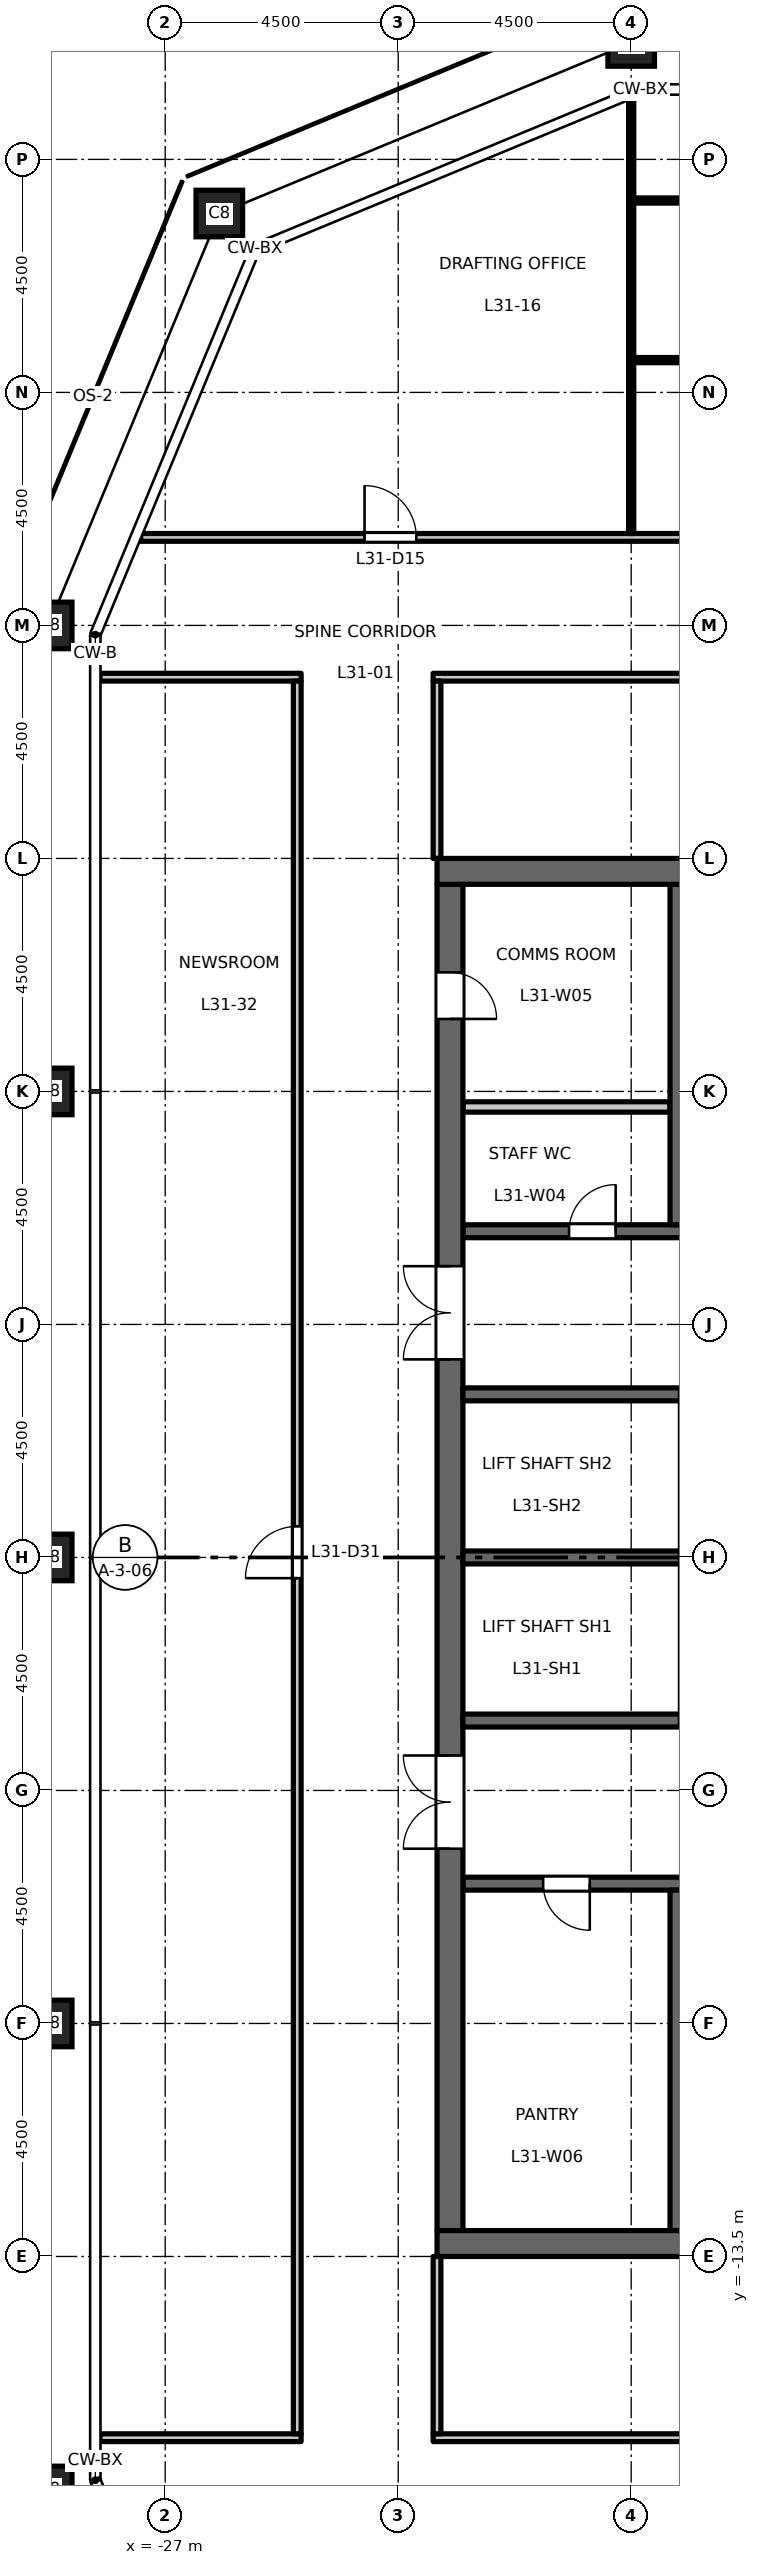
"""IFC4 building model, lengths in metres.
Left out: names, types, materials, properties, quantities, classifications, styles, units other than length and angle.
Written with IfcOpenShell. Run it as: python <this file> out.ifc"""

import sys

from ifc_helpers import new_model, si_unit, direction, frame, frame_2d, origin, origin_2d, place, context, subcontext, project, spatial, rectangle, hollow_rectangle, extrude, element, fill, save


model = new_model("IFC4")
c1 = context("Model", 3, precision=1e-05, world=origin(), true_north=direction((0.0, 1.0)))
c2 = subcontext(c1, "Body", "Model", "MODEL_VIEW")
j1 = project(units=[si_unit("LENGTHUNIT", "METRE"), si_unit("PLANEANGLEUNIT", "RADIAN")], contexts=[c1])
p1 = place(None, origin())
s1 = spatial("IfcSite", under=j1, at=p1, CompositionType="ELEMENT")
p2 = place(p1, origin())
s2 = spatial("IfcBuilding", under=s1, at=p2, CompositionType="ELEMENT")
p3 = place(p2, frame((0.0, 0.0, 145.2)))
s3 = spatial("IfcBuildingStorey", under=s2, at=p3, CompositionType="ELEMENT", Elevation=145.2)
for number, where, z_axis, x_axis in (
    (1, (-18.0, 29.25, 0.0), (0.0, 0.0, 1.0), (1.0, 0.0, 0.0)),
    (2, (-25.955, 25.955, 0.0), (0.0, 0.0, 1.0), (1.0, 0.0, 0.0)),
    (3, (-29.25, 18.0, 0.0), (0.0, 0.0, 1.0), (1.0, 0.0, 0.0)),
    (4, (-29.25, 9.0, 0.0), (0.0, 0.0, 1.0), (1.0, 0.0, 0.0)),
    (5, (-29.25, 0.0, 0.0), (0.0, 0.0, 1.0), (1.0, 0.0, 0.0)),
    (6, (-29.25, -9.0, 0.0), (0.0, 0.0, 1.0), (1.0, 0.0, 0.0)),
    (7, (-29.25, -18.0, 0.0), (0.0, 0.0, 1.0), (1.0, 0.0, 0.0)),
):
    element("IfcColumn", number, at=place(p3, frame(where, z_axis=z_axis, x_axis=x_axis)), inside=s3, PredefinedType="COLUMN", context=c2, shape_type="SweptSolid", body=[
        extrude(hollow_rectangle(XDim=0.9, YDim=0.9, WallThickness=0.05, at=origin_2d()), origin(), (0.0, 0.0, 1.0), 4.5),
    ])
p4 = place(p3, frame((-17.0, 6.3, 0.0), z_axis=(0.0, 0.0, 1.0), x_axis=(-1.0, 0.0, 0.0)))
e8 = element("IfcWall", 8, at=p4, inside=s3, PredefinedType="SHEAR", context=c2, shape_type="SweptSolid", body=[
    extrude(rectangle(XDim=4.25, YDim=0.25, at=frame_2d((2.125, 0.0))), origin(), (0.0, 0.0, 1.0), 4.35),
])
p5 = place(p4, frame((1.3, 0.0, 0.0)))
e9 = element("IfcOpeningElement", 9, at=p5, cuts=e8, PredefinedType="OPENING", context=c2, shape_type="SweptSolid", body=[
    extrude(rectangle(XDim=0.9, YDim=2.1, at=frame_2d((0.45, 1.05))), frame((0.0, 0.135, 0.0), z_axis=(0.0, -1.0, 0.0), x_axis=(1.0, 0.0, 0.0)), (0.0, 0.0, 1.0), 0.27),
])
p6 = place(p3, frame((-12.15, -6.3, 0.0), z_axis=(0.0, 0.0, 1.0), x_axis=(-1.0, 0.0, 0.0)))
e10 = element("IfcWall", 10, at=p6, inside=s3, PredefinedType="SHEAR", context=c2, shape_type="SweptSolid", body=[
    extrude(rectangle(XDim=9.1, YDim=0.25, at=frame_2d((4.55, 0.0))), origin(), (0.0, 0.0, 1.0), 4.35),
])
p7 = place(p6, frame((1.8, 0.0, 0.0)))
e11 = element("IfcOpeningElement", 11, at=p7, cuts=e10, PredefinedType="OPENING", context=c2, shape_type="SweptSolid", body=[
    extrude(rectangle(XDim=1.0, YDim=2.1, at=frame_2d((0.5, 1.05))), frame((0.0, 0.135, 0.0), z_axis=(0.0, -1.0, 0.0), x_axis=(1.0, 0.0, 0.0)), (0.0, 0.0, 1.0), 0.27),
])
p8 = place(p6, frame((6.65, 0.0, 0.0)))
e12 = element("IfcOpeningElement", 12, at=p8, cuts=e10, PredefinedType="OPENING", context=c2, shape_type="SweptSolid", body=[
    extrude(rectangle(XDim=0.9, YDim=2.1, at=frame_2d((0.45, 1.05))), frame((0.0, 0.135, 0.0), z_axis=(0.0, -1.0, 0.0), x_axis=(1.0, 0.0, 0.0)), (0.0, 0.0, 1.0), 0.27),
])
p9 = place(p3, frame((-21.5, -13.0, 0.0), z_axis=(0.0, 0.0, 1.0), x_axis=(0.0, 1.0, 0.0)))
e13 = element("IfcWall", 13, at=p9, inside=s3, PredefinedType="SHEAR", context=c2, shape_type="SweptSolid", body=[
    extrude(rectangle(XDim=26.0, YDim=0.5, at=frame_2d((13.0, 0.0))), origin(), (0.0, 0.0, 1.0), 4.35),
])
p10 = place(p9, frame((16.825, 0.0, 0.0)))
e14 = element("IfcOpeningElement", 14, at=p10, cuts=e13, PredefinedType="OPENING", context=c2, shape_type="SweptSolid", body=[
    extrude(rectangle(XDim=1.8, YDim=2.1, at=frame_2d((0.9, 1.05))), frame((0.0, 0.26, 0.0), z_axis=(0.0, -1.0, 0.0), x_axis=(1.0, 0.0, 0.0)), (0.0, 0.0, 1.0), 0.52),
])
p11 = place(p9, frame((7.375, 0.0, 0.0)))
e15 = element("IfcOpeningElement", 15, at=p11, cuts=e13, PredefinedType="OPENING", context=c2, shape_type="SweptSolid", body=[
    extrude(rectangle(XDim=1.8, YDim=2.1, at=frame_2d((0.9, 1.05))), frame((0.0, 0.26, 0.0), z_axis=(0.0, -1.0, 0.0), x_axis=(1.0, 0.0, 0.0)), (0.0, 0.0, 1.0), 0.52),
])
p12 = place(p9, frame((23.4, 0.0, 0.0)))
e16 = element("IfcOpeningElement", 16, at=p12, cuts=e13, PredefinedType="OPENING", context=c2, shape_type="SweptSolid", body=[
    extrude(rectangle(XDim=0.9, YDim=2.1, at=frame_2d((0.45, 1.05))), frame((0.0, 0.26, 0.0), z_axis=(0.0, -1.0, 0.0), x_axis=(1.0, 0.0, 0.0)), (0.0, 0.0, 1.0), 0.52),
])
p13 = place(p3, frame((-17.25, 8.7, 0.0), z_axis=(0.0, 0.0, 1.0), x_axis=(-1.0, 0.0, 0.0)))
e17 = element("IfcWall", 17, at=p13, inside=s3, PredefinedType="PARTITIONING", context=c2, shape_type="SweptSolid", body=[
    extrude(rectangle(XDim=4.0, YDim=0.2, at=frame_2d((2.0, 0.0))), origin(), (0.0, 0.0, 1.0), 4.35),
])
for number, where, z_axis, x_axis in (
    (18, (-17.05, 0.0, 0.0), (0.0, 0.0, 1.0), (-1.0, 0.0, 0.0)),
    (19, (-17.05, 3.15, 0.0), (0.0, 0.0, 1.0), (-1.0, 0.0, 0.0)),
    (20, (-17.05, -3.15, 0.0), (0.0, 0.0, 1.0), (-1.0, 0.0, 0.0)),
):
    element("IfcWall", number, at=place(p3, frame(where, z_axis=z_axis, x_axis=x_axis)), inside=s3, PredefinedType="SHEAR", context=c2, shape_type="SweptSolid", body=[
        extrude(rectangle(XDim=4.2, YDim=0.25, at=frame_2d((2.1, 0.0))), origin(), (0.0, 0.0, 1.0), 4.35),
    ])
for number, where, z_axis, x_axis in (
    (21, (-17.0, 6.425, 0.0), (0.0, 0.0, 1.0), (0.0, 1.0, 0.0)),
    (22, (-17.0, -13.0, 0.0), (0.0, 0.0, 1.0), (0.0, 1.0, 0.0)),
):
    element("IfcWall", number, at=place(p3, frame(where, z_axis=z_axis, x_axis=x_axis)), inside=s3, PredefinedType="SHEAR", context=c2, shape_type="SweptSolid", body=[
        extrude(rectangle(XDim=6.575, YDim=0.5, at=frame_2d((3.288, 0.0))), origin(), (0.0, 0.0, 1.0), 4.35),
    ])
for number, where, z_axis, x_axis in (
    (23, (-8.25, 13.25, 0.0), (0.0, 0.0, 1.0), (-1.0, 0.0, 0.0)),
    (24, (-8.25, -13.25, 0.0), (0.0, 0.0, 1.0), (-1.0, 0.0, 0.0)),
):
    element("IfcWall", number, at=place(p3, frame(where, z_axis=z_axis, x_axis=x_axis)), inside=s3, PredefinedType="SHEAR", context=c2, shape_type="SweptSolid", body=[
        extrude(rectangle(XDim=13.5, YDim=0.5, at=frame_2d((6.75, 0.0))), origin(), (0.0, 0.0, 1.0), 4.35),
    ])
p14 = place(p3, frame((-28.26, -17.0, 0.0), z_axis=(0.0, 0.0, 1.0), x_axis=(1.0, 0.0, 0.0)))
e25 = element("IfcWall", 25, at=p14, inside=s3, PredefinedType="PARTITIONING", context=c2, shape_type="SweptSolid", body=[
    extrude(rectangle(XDim=3.885, YDim=0.15, at=frame_2d((1.942, 0.0))), origin(), (0.0, 0.0, 1.0), 4.35),
])
p15 = place(p3, frame((-21.825, -17.0, 0.0), z_axis=(0.0, 0.0, 1.0), x_axis=(1.0, 0.0, 0.0)))
e26 = element("IfcWall", 26, at=p15, inside=s3, PredefinedType="PARTITIONING", context=c2, shape_type="SweptSolid", body=[
    extrude(rectangle(XDim=43.65, YDim=0.15, at=frame_2d((21.825, 0.0))), origin(), (0.0, 0.0, 1.0), 4.35),
])
p16 = place(p15, frame((17.175, 0.0, 0.0)))
e27 = element("IfcOpeningElement", 27, at=p16, cuts=e26, PredefinedType="OPENING", context=c2, shape_type="SweptSolid", body=[
    extrude(rectangle(XDim=1.0, YDim=2.1, at=frame_2d((0.5, 1.05))), frame((0.0, 0.085, 0.0), z_axis=(0.0, -1.0, 0.0), x_axis=(1.0, 0.0, 0.0)), (0.0, 0.0, 1.0), 0.17),
])
p17 = place(p15, frame((25.425, 0.0, 0.0)))
e28 = element("IfcOpeningElement", 28, at=p17, cuts=e26, PredefinedType="OPENING", context=c2, shape_type="SweptSolid", body=[
    extrude(rectangle(XDim=1.0, YDim=2.1, at=frame_2d((0.5, 1.05))), frame((0.0, 0.085, 0.0), z_axis=(0.0, -1.0, 0.0), x_axis=(1.0, 0.0, 0.0)), (0.0, 0.0, 1.0), 0.17),
])
p18 = place(p15, frame((6.425, 0.0, 0.0)))
e29 = element("IfcOpeningElement", 29, at=p18, cuts=e26, PredefinedType="OPENING", context=c2, shape_type="SweptSolid", body=[
    extrude(rectangle(XDim=1.0, YDim=2.1, at=frame_2d((0.5, 1.05))), frame((0.0, 0.085, 0.0), z_axis=(0.0, -1.0, 0.0), x_axis=(1.0, 0.0, 0.0)), (0.0, 0.0, 1.0), 0.17),
])
p19 = place(p15, frame((36.425, 0.0, 0.0)))
e30 = element("IfcOpeningElement", 30, at=p19, cuts=e26, PredefinedType="OPENING", context=c2, shape_type="SweptSolid", body=[
    extrude(rectangle(XDim=1.0, YDim=2.1, at=frame_2d((0.5, 1.05))), frame((0.0, 0.085, 0.0), z_axis=(0.0, -1.0, 0.0), x_axis=(1.0, 0.0, 0.0)), (0.0, 0.0, 1.0), 0.17),
])
p20 = place(p3, frame((-28.26, 17.0, 0.0), z_axis=(0.0, 0.0, 1.0), x_axis=(1.0, 0.0, 0.0)))
e31 = element("IfcWall", 31, at=p20, inside=s3, PredefinedType="PARTITIONING", context=c2, shape_type="SweptSolid", body=[
    extrude(rectangle(XDim=3.885, YDim=0.15, at=frame_2d((1.942, 0.0))), origin(), (0.0, 0.0, 1.0), 4.35),
])
p21 = place(p3, frame((-21.825, 17.0, 0.0), z_axis=(0.0, 0.0, 1.0), x_axis=(1.0, 0.0, 0.0)))
e32 = element("IfcWall", 32, at=p21, inside=s3, PredefinedType="PARTITIONING", context=c2, shape_type="SweptSolid", body=[
    extrude(rectangle(XDim=43.65, YDim=0.15, at=frame_2d((21.825, 0.0))), origin(), (0.0, 0.0, 1.0), 4.35),
])
p22 = place(p21, frame((21.225, 0.0, 0.0)))
e33 = element("IfcOpeningElement", 33, at=p22, cuts=e32, PredefinedType="OPENING", context=c2, shape_type="SweptSolid", body=[
    extrude(rectangle(XDim=1.0, YDim=2.1, at=frame_2d((0.5, 1.05))), frame((0.0, 0.085, 0.0), z_axis=(0.0, -1.0, 0.0), x_axis=(1.0, 0.0, 0.0)), (0.0, 0.0, 1.0), 0.17),
])
p23 = place(p21, frame((6.225, 0.0, 0.0)))
e34 = element("IfcOpeningElement", 34, at=p23, cuts=e32, PredefinedType="OPENING", context=c2, shape_type="SweptSolid", body=[
    extrude(rectangle(XDim=1.0, YDim=2.1, at=frame_2d((0.5, 1.05))), frame((0.0, 0.085, 0.0), z_axis=(0.0, -1.0, 0.0), x_axis=(1.0, 0.0, 0.0)), (0.0, 0.0, 1.0), 0.17),
])
p24 = place(p21, frame((36.225, 0.0, 0.0)))
e35 = element("IfcOpeningElement", 35, at=p24, cuts=e32, PredefinedType="OPENING", context=c2, shape_type="SweptSolid", body=[
    extrude(rectangle(XDim=1.0, YDim=2.1, at=frame_2d((0.5, 1.05))), frame((0.0, 0.085, 0.0), z_axis=(0.0, -1.0, 0.0), x_axis=(1.0, 0.0, 0.0)), (0.0, 0.0, 1.0), 0.17),
])
p25 = place(p3, frame((-27.474, 19.7, 0.0), z_axis=(0.0, 0.0, 1.0), x_axis=(1.0, 0.0, 0.0)))
e36 = element("IfcWall", 36, at=p25, inside=s3, PredefinedType="PARTITIONING", context=c2, shape_type="SweptSolid", body=[
    extrude(rectangle(XDim=54.948, YDim=0.15, at=frame_2d((27.474, 0.0))), origin(), (0.0, 0.0, 1.0), 4.35),
])
p26 = place(p25, frame((13.574, 0.0, 0.0)))
e37 = element("IfcOpeningElement", 37, at=p26, cuts=e36, PredefinedType="OPENING", context=c2, shape_type="SweptSolid", body=[
    extrude(rectangle(XDim=1.0, YDim=2.1, at=frame_2d((0.5, 1.05))), frame((0.0, 0.085, 0.0), z_axis=(0.0, -1.0, 0.0), x_axis=(1.0, 0.0, 0.0)), (0.0, 0.0, 1.0), 0.17),
])
p27 = place(p25, frame((22.574, 0.0, 0.0)))
e38 = element("IfcOpeningElement", 38, at=p27, cuts=e36, PredefinedType="OPENING", context=c2, shape_type="SweptSolid", body=[
    extrude(rectangle(XDim=1.0, YDim=2.1, at=frame_2d((0.5, 1.05))), frame((0.0, 0.085, 0.0), z_axis=(0.0, -1.0, 0.0), x_axis=(1.0, 0.0, 0.0)), (0.0, 0.0, 1.0), 0.17),
])
p28 = place(p25, frame((31.574, 0.0, 0.0)))
e39 = element("IfcOpeningElement", 39, at=p28, cuts=e36, PredefinedType="OPENING", context=c2, shape_type="SweptSolid", body=[
    extrude(rectangle(XDim=1.0, YDim=2.1, at=frame_2d((0.5, 1.05))), frame((0.0, 0.085, 0.0), z_axis=(0.0, -1.0, 0.0), x_axis=(1.0, 0.0, 0.0)), (0.0, 0.0, 1.0), 0.17),
])
p29 = place(p25, frame((40.574, 0.0, 0.0)))
e40 = element("IfcOpeningElement", 40, at=p29, cuts=e36, PredefinedType="OPENING", context=c2, shape_type="SweptSolid", body=[
    extrude(rectangle(XDim=1.0, YDim=2.1, at=frame_2d((0.5, 1.05))), frame((0.0, 0.085, 0.0), z_axis=(0.0, -1.0, 0.0), x_axis=(1.0, 0.0, 0.0)), (0.0, 0.0, 1.0), 0.17),
])
p30 = place(p25, frame((4.324, 0.0, 0.0)))
e41 = element("IfcOpeningElement", 41, at=p30, cuts=e36, PredefinedType="OPENING", context=c2, shape_type="SweptSolid", body=[
    extrude(rectangle(XDim=1.0, YDim=2.1, at=frame_2d((0.5, 1.05))), frame((0.0, 0.085, 0.0), z_axis=(0.0, -1.0, 0.0), x_axis=(1.0, 0.0, 0.0)), (0.0, 0.0, 1.0), 0.17),
])
p31 = place(p25, frame((49.798, 0.0, 0.0)))
e42 = element("IfcOpeningElement", 42, at=p31, cuts=e36, PredefinedType="OPENING", context=c2, shape_type="SweptSolid", body=[
    extrude(rectangle(XDim=1.0, YDim=2.1, at=frame_2d((0.5, 1.05))), frame((0.0, 0.085, 0.0), z_axis=(0.0, -1.0, 0.0), x_axis=(1.0, 0.0, 0.0)), (0.0, 0.0, 1.0), 0.17),
])
p32 = place(p3, frame((-17.95, 23.124, 0.0), z_axis=(0.0, 0.0, 1.0), x_axis=(1.0, 0.0, 0.0)))
e43 = element("IfcWall", 43, at=p32, inside=s3, PredefinedType="PARTITIONING", context=c2, shape_type="SweptSolid", body=[
    extrude(rectangle(XDim=8.9, YDim=0.1, at=frame_2d((4.45, 0.0))), origin(), (0.0, 0.0, 1.0), 4.35),
])
p33 = place(p32, frame((4.05, 0.0, 0.0)))
e44 = element("IfcOpeningElement", 44, at=p33, cuts=e43, PredefinedType="OPENING", context=c2, shape_type="SweptSolid", body=[
    extrude(rectangle(XDim=1.0, YDim=2.1, at=frame_2d((0.5, 1.05))), frame((0.0, 0.06, 0.0), z_axis=(0.0, -1.0, 0.0), x_axis=(1.0, 0.0, 0.0)), (0.0, 0.0, 1.0), 0.12),
])
p34 = place(p3, frame((-17.95, 26.206, 0.0), z_axis=(0.0, 0.0, 1.0), x_axis=(1.0, 0.0, 0.0)))
e45 = element("IfcWall", 45, at=p34, inside=s3, PredefinedType="PARTITIONING", context=c2, shape_type="SweptSolid", body=[
    extrude(rectangle(XDim=8.9, YDim=0.1, at=frame_2d((4.45, 0.0))), origin(), (0.0, 0.0, 1.0), 4.35),
])
p35 = place(p34, frame((4.05, 0.0, 0.0)))
e46 = element("IfcOpeningElement", 46, at=p35, cuts=e45, PredefinedType="OPENING", context=c2, shape_type="SweptSolid", body=[
    extrude(rectangle(XDim=1.0, YDim=2.1, at=frame_2d((0.5, 1.05))), frame((0.0, 0.06, 0.0), z_axis=(0.0, -1.0, 0.0), x_axis=(1.0, 0.0, 0.0)), (0.0, 0.0, 1.0), 0.12),
])
p36 = place(p3, frame((-24.45, -16.925, 0.0), z_axis=(0.0, 0.0, 1.0), x_axis=(0.0, 1.0, 0.0)))
e47 = element("IfcWall", 47, at=p36, inside=s3, PredefinedType="PARTITIONING", context=c2, shape_type="SweptSolid", body=[
    extrude(rectangle(XDim=33.85, YDim=0.15, at=frame_2d((16.925, 0.0))), origin(), (0.0, 0.0, 1.0), 4.35),
])
p37 = place(p36, frame((16.525, 0.0, 0.0)))
e48 = element("IfcOpeningElement", 48, at=p37, cuts=e47, PredefinedType="OPENING", context=c2, shape_type="SweptSolid", body=[
    extrude(rectangle(XDim=1.0, YDim=2.1, at=frame_2d((0.5, 1.05))), frame((0.0, 0.085, 0.0), z_axis=(0.0, -1.0, 0.0), x_axis=(1.0, 0.0, 0.0)), (0.0, 0.0, 1.0), 0.17),
])
for number, where, z_axis, x_axis in (
    (49, (-21.75, -16.925, 0.0), (0.0, 0.0, 1.0), (0.0, 1.0, 0.0)),
    (50, (-21.75, 13.5, 0.0), (0.0, 0.0, 1.0), (0.0, 1.0, 0.0)),
):
    element("IfcWall", number, at=place(p3, frame(where, z_axis=z_axis, x_axis=x_axis)), inside=s3, PredefinedType="PARTITIONING", context=c2, shape_type="SweptSolid", body=[
        extrude(rectangle(XDim=3.425, YDim=0.15, at=frame_2d((1.712, 0.0))), origin(), (0.0, 0.0, 1.0), 4.35),
    ])
p38 = place(p3, frame((-18.0, 19.775, 0.0), z_axis=(0.0, 0.0, 1.0), x_axis=(0.0, 1.0, 0.0)))
e51 = element("IfcWall", 51, at=p38, inside=s3, PredefinedType="PARTITIONING", context=c2, shape_type="SweptSolid", body=[
    extrude(rectangle(XDim=8.403, YDim=0.1, at=frame_2d((4.202, 0.0))), origin(), (0.0, 0.0, 1.0), 3.45),
])
p39 = place(p10, origin())
e52 = element("IfcDoor", 52, at=p39, inside=s3, OperationType="DOUBLE_DOOR_DOUBLE_SWING", PredefinedType="DOOR", context=c2, shape_type="SweptSolid", body=[
    extrude(rectangle(XDim=1.8, YDim=2.1, at=frame_2d((0.9, 1.05))), frame((0.0, 0.025, 0.0), z_axis=(0.0, -1.0, 0.0), x_axis=(1.0, 0.0, 0.0)), (0.0, 0.0, 1.0), 0.05),
])
fill(e14, e52)
p40 = place(p11, origin())
e53 = element("IfcDoor", 53, at=p40, inside=s3, OperationType="DOUBLE_DOOR_DOUBLE_SWING", PredefinedType="DOOR", context=c2, shape_type="SweptSolid", body=[
    extrude(rectangle(XDim=1.8, YDim=2.1, at=frame_2d((0.9, 1.05))), frame((0.0, 0.025, 0.0), z_axis=(0.0, -1.0, 0.0), x_axis=(1.0, 0.0, 0.0)), (0.0, 0.0, 1.0), 0.05),
])
fill(e15, e53)
p41 = place(p5, origin())
e54 = element("IfcDoor", 54, at=p41, inside=s3, OperationType="SINGLE_SWING_LEFT", PredefinedType="DOOR", context=c2, shape_type="SweptSolid", body=[
    extrude(rectangle(XDim=0.9, YDim=2.1, at=frame_2d((0.45, 1.05))), frame((0.0, 0.025, 0.0), z_axis=(0.0, -1.0, 0.0), x_axis=(1.0, 0.0, 0.0)), (0.0, 0.0, 1.0), 0.05),
])
fill(e9, e54)
p42 = place(p12, origin())
e55 = element("IfcDoor", 55, at=p42, inside=s3, OperationType="SINGLE_SWING_LEFT", PredefinedType="DOOR", context=c2, shape_type="SweptSolid", body=[
    extrude(rectangle(XDim=0.9, YDim=2.1, at=frame_2d((0.45, 1.05))), frame((0.0, 0.025, 0.0), z_axis=(0.0, -1.0, 0.0), x_axis=(1.0, 0.0, 0.0)), (0.0, 0.0, 1.0), 0.05),
])
fill(e16, e55)
p43 = place(p8, origin())
e56 = element("IfcDoor", 56, at=p43, inside=s3, OperationType="SINGLE_SWING_RIGHT", PredefinedType="DOOR", context=c2, shape_type="SweptSolid", body=[
    extrude(rectangle(XDim=0.9, YDim=2.1, at=frame_2d((0.45, 1.05))), frame((0.0, 0.025, 0.0), z_axis=(0.0, -1.0, 0.0), x_axis=(1.0, 0.0, 0.0)), (0.0, 0.0, 1.0), 0.05),
])
fill(e12, e56)
p44 = place(p30, origin())
e57 = element("IfcDoor", 57, at=p44, inside=s3, OperationType="SINGLE_SWING_LEFT", PredefinedType="DOOR", context=c2, shape_type="SweptSolid", body=[
    extrude(rectangle(XDim=1.0, YDim=2.1, at=frame_2d((0.5, 1.05))), frame((0.0, 0.025, 0.0), z_axis=(0.0, -1.0, 0.0), x_axis=(1.0, 0.0, 0.0)), (0.0, 0.0, 1.0), 0.05),
])
fill(e41, e57)
p45 = place(p37, origin())
e58 = element("IfcDoor", 58, at=p45, inside=s3, OperationType="SINGLE_SWING_LEFT", PredefinedType="DOOR", context=c2, shape_type="SweptSolid", body=[
    extrude(rectangle(XDim=1.0, YDim=2.1, at=frame_2d((0.5, 1.05))), frame((0.0, 0.025, 0.0), z_axis=(0.0, -1.0, 0.0), x_axis=(1.0, 0.0, 0.0)), (0.0, 0.0, 1.0), 0.05),
])
fill(e48, e58)
save(model, sys.argv[1])
